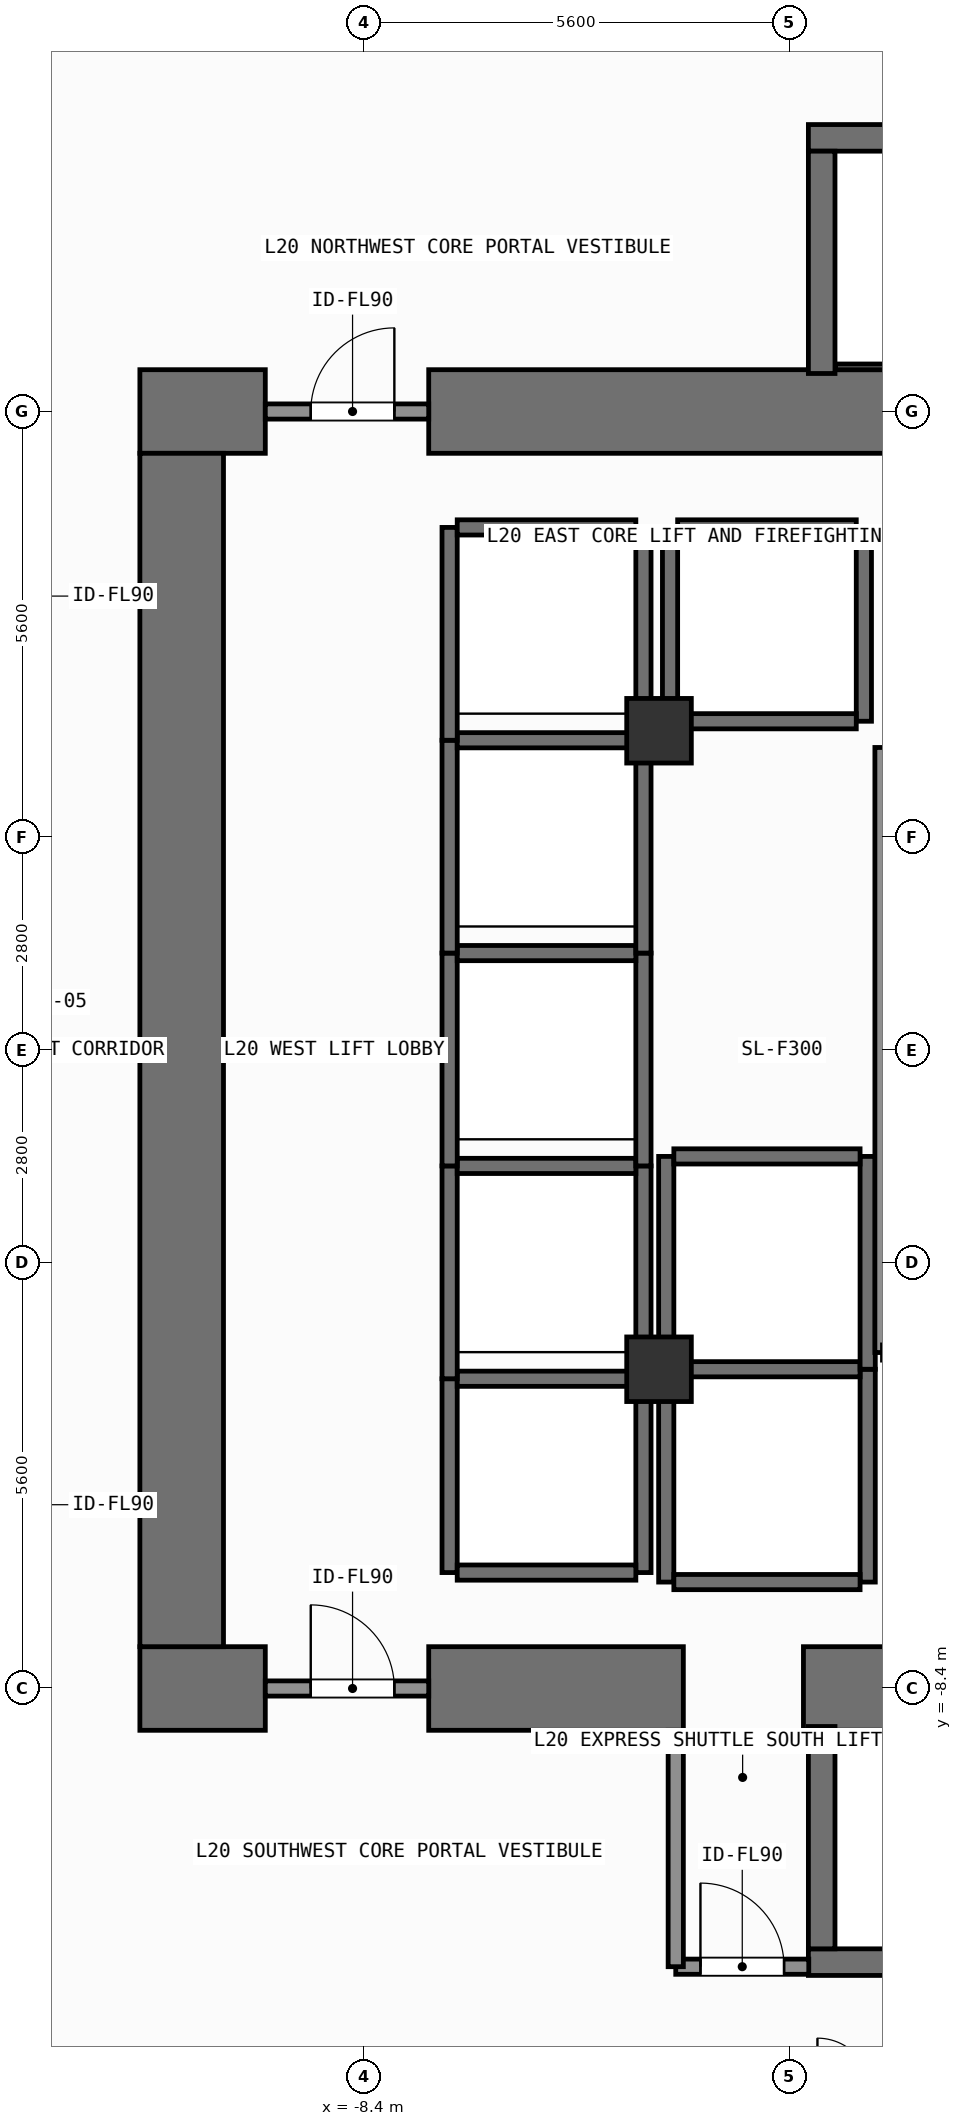
"""IFC4 building model, lengths in metres.
Left out: names, types, materials, properties, quantities, classifications, styles, units other than length and angle.
Written with IfcOpenShell. Run it as: python <this file> out.ifc"""

import sys

from ifc_helpers import new_model, si_unit, direction, frame, frame_2d, origin, origin_2d, place, context, subcontext, project, spatial, rectangle, extrude, element, fill, save


model = new_model("IFC4")
c1 = context("Model", 3, precision=1e-05, world=origin(), true_north=direction((0.0, 1.0)))
c2 = subcontext(c1, "Body", "Model", "MODEL_VIEW")
j1 = project(units=[si_unit("LENGTHUNIT", "METRE"), si_unit("PLANEANGLEUNIT", "RADIAN")], contexts=[c1])
p1 = place(None, origin())
s1 = spatial("IfcSite", under=j1, at=p1, CompositionType="ELEMENT")
p2 = place(p1, origin())
s2 = spatial("IfcBuilding", under=s1, at=p2, CompositionType="ELEMENT")
p3 = place(p2, frame((0.0, 0.0, 77.4)))
s3 = spatial("IfcBuildingStorey", under=s2, at=p3, CompositionType="ELEMENT", Elevation=77.4)
p4 = place(p3, frame((-11.35, -8.4, 0.0), z_axis=(0.0, 0.0, 1.0), x_axis=(1.0, 0.0, 0.0)))
e1 = element("IfcWall", 1, at=p4, inside=s3, PredefinedType="SHEAR", context=c2, shape_type="SweptSolid", body=[
    extrude(rectangle(XDim=1.65, YDim=1.1, at=frame_2d((0.825, 0.0))), origin(), (0.0, 0.0, 1.0), 7.8),
])
p5 = place(p3, frame((-7.55, -8.4, 0.0), z_axis=(0.0, 0.0, 1.0), x_axis=(1.0, 0.0, 0.0)))
e2 = element("IfcWall", 2, at=p5, inside=s3, PredefinedType="SHEAR", context=c2, shape_type="SweptSolid", body=[
    extrude(rectangle(XDim=3.35, YDim=1.1, at=frame_2d((1.675, 0.0))), origin(), (0.0, 0.0, 1.0), 7.8),
])
p6 = place(p3, frame((-2.62, -8.4, 0.0), z_axis=(0.0, 0.0, 1.0), x_axis=(1.0, 0.0, 0.0)))
e3 = element("IfcWall", 3, at=p6, inside=s3, PredefinedType="SHEAR", context=c2, shape_type="SweptSolid", body=[
    extrude(rectangle(XDim=7.27, YDim=1.1, at=frame_2d((3.635, 0.0))), origin(), (0.0, 0.0, 1.0), 7.8),
])
p7 = place(p3, frame((-11.35, 8.4, 0.0), z_axis=(0.0, 0.0, 1.0), x_axis=(1.0, 0.0, 0.0)))
e4 = element("IfcWall", 4, at=p7, inside=s3, PredefinedType="SHEAR", context=c2, shape_type="SweptSolid", body=[
    extrude(rectangle(XDim=1.65, YDim=1.1, at=frame_2d((0.825, 0.0))), origin(), (0.0, 0.0, 1.0), 7.8),
])
p8 = place(p3, frame((-7.55, 8.4, 0.0), z_axis=(0.0, 0.0, 1.0), x_axis=(1.0, 0.0, 0.0)))
e5 = element("IfcWall", 5, at=p8, inside=s3, PredefinedType="SHEAR", context=c2, shape_type="SweptSolid", body=[
    extrude(rectangle(XDim=16.5, YDim=1.1, at=frame_2d((8.25, 0.0))), origin(), (0.0, 0.0, 1.0), 7.8),
])
p9 = place(p3, frame((-10.8, -7.85, 0.0), z_axis=(0.0, 0.0, 1.0), x_axis=(0.0, 1.0, 0.0)))
e6 = element("IfcWall", 6, at=p9, inside=s3, PredefinedType="SHEAR", context=c2, shape_type="SweptSolid", body=[
    extrude(rectangle(XDim=15.7, YDim=1.1, at=frame_2d((7.85, 0.0))), origin(), (0.0, 0.0, 1.0), 7.8),
])
p10 = place(p3, frame((-2.555, -12.0, 0.0), z_axis=(0.0, 0.0, 1.0), x_axis=(1.0, 0.0, 0.0)))
e7 = element("IfcWall", 7, at=p10, inside=s3, PredefinedType="SHEAR", context=c2, shape_type="SweptSolid", body=[
    extrude(rectangle(XDim=7.31, YDim=0.35, at=frame_2d((3.655, 0.0))), origin(), (0.0, 0.0, 1.0), 7.8),
])
p11 = place(p3, frame((-2.2, -8.988, 0.0), z_axis=(0.0, 0.0, 1.0), x_axis=(1.0, 0.0, 0.0)))
e8 = element("IfcWall", 8, at=p11, inside=s3, PredefinedType="SHEAR", context=c2, shape_type="SweptSolid", body=[
    extrude(rectangle(XDim=6.6, YDim=0.075, at=frame_2d((3.3, 0.0))), origin(), (0.0, 0.0, 1.0), 7.8),
])
p12 = place(p3, frame((-2.38, -11.825, 0.0), z_axis=(0.0, 0.0, 1.0), x_axis=(0.0, 1.0, 0.0)))
e9 = element("IfcWall", 9, at=p12, inside=s3, PredefinedType="SHEAR", context=c2, shape_type="SweptSolid", body=[
    extrude(rectangle(XDim=2.925, YDim=0.35, at=frame_2d((1.462, 0.0))), origin(), (0.0, 0.0, 1.0), 7.8),
])
p13 = place(p3, frame((-2.555, 12.0, 0.0), z_axis=(0.0, 0.0, 1.0), x_axis=(1.0, 0.0, 0.0)))
e10 = element("IfcWall", 10, at=p13, inside=s3, PredefinedType="SHEAR", context=c2, shape_type="SweptSolid", body=[
    extrude(rectangle(XDim=7.31, YDim=0.35, at=frame_2d((3.655, 0.0))), origin(), (0.0, 0.0, 1.0), 7.8),
])
p14 = place(p3, frame((-2.2, 8.988, 0.0), z_axis=(0.0, 0.0, 1.0), x_axis=(1.0, 0.0, 0.0)))
e11 = element("IfcWall", 11, at=p14, inside=s3, PredefinedType="SHEAR", context=c2, shape_type="SweptSolid", body=[
    extrude(rectangle(XDim=6.6, YDim=0.075, at=frame_2d((3.3, 0.0))), origin(), (0.0, 0.0, 1.0), 7.8),
])
p15 = place(p3, frame((-2.38, 8.9, 0.0), z_axis=(0.0, 0.0, 1.0), x_axis=(0.0, 1.0, 0.0)))
e12 = element("IfcWall", 12, at=p15, inside=s3, PredefinedType="SHEAR", context=c2, shape_type="SweptSolid", body=[
    extrude(rectangle(XDim=2.925, YDim=0.35, at=frame_2d((1.462, 0.0))), origin(), (0.0, 0.0, 1.0), 7.8),
])
for number, where, z_axis, x_axis in (
    (13, (-4.52, -4.2, 0.0), (0.0, 0.0, 1.0), (1.0, 0.0, 0.0)),
    (14, (-4.52, 4.2, 0.0), (0.0, 0.0, 1.0), (1.0, 0.0, 0.0)),
):
    element("IfcColumn", number, at=place(p3, frame(where, z_axis=z_axis, x_axis=x_axis)), inside=s3, PredefinedType="COLUMN", context=c2, shape_type="SweptSolid", body=[
        extrude(rectangle(XDim=0.85, YDim=0.85, at=origin_2d()), origin(), (0.0, 0.0, 1.0), 7.8),
    ])
for number, where, z_axis, x_axis in (
    (15, (-7.275, -6.875, 0.0), (0.0, 0.0, 1.0), (0.0, 1.0, 0.0)),
    (16, (-4.725, -6.875, 0.0), (0.0, 0.0, 1.0), (0.0, 1.0, 0.0)),
):
    element("IfcWall", number, at=place(p3, frame(where, z_axis=z_axis, x_axis=x_axis)), inside=s3, PredefinedType="SHEAR", context=c2, shape_type="SweptSolid", body=[
        extrude(rectangle(XDim=2.55, YDim=0.2, at=frame_2d((1.275, 0.0))), origin(), (0.0, 0.0, 1.0), 7.52),
    ])
for number, where, z_axis, x_axis in (
    (17, (-7.175, -6.875, 0.0), (0.0, 0.0, 1.0), (1.0, 0.0, 0.0)),
    (18, (-7.175, -4.325, 0.0), (0.0, 0.0, 1.0), (1.0, 0.0, 0.0)),
):
    element("IfcWall", number, at=place(p3, frame(where, z_axis=z_axis, x_axis=x_axis)), inside=s3, PredefinedType="SHEAR", context=c2, shape_type="SweptSolid", body=[
        extrude(rectangle(XDim=2.35, YDim=0.2, at=frame_2d((1.175, 0.0))), origin(), (0.0, 0.0, 1.0), 7.52),
    ])
for number, where, z_axis, x_axis in (
    (19, (-7.275, -4.325, 0.0), (0.0, 0.0, 1.0), (0.0, 1.0, 0.0)),
    (20, (-4.725, -4.325, 0.0), (0.0, 0.0, 1.0), (0.0, 1.0, 0.0)),
):
    element("IfcWall", number, at=place(p3, frame(where, z_axis=z_axis, x_axis=x_axis)), inside=s3, PredefinedType="SHEAR", context=c2, shape_type="SweptSolid", body=[
        extrude(rectangle(XDim=2.8, YDim=0.2, at=frame_2d((1.4, 0.0))), origin(), (0.0, 0.0, 1.0), 7.52),
    ])
p16 = place(p3, frame((-7.175, -1.525, 0.0), z_axis=(0.0, 0.0, 1.0), x_axis=(1.0, 0.0, 0.0)))
e21 = element("IfcWall", 21, at=p16, inside=s3, PredefinedType="SHEAR", context=c2, shape_type="SweptSolid", body=[
    extrude(rectangle(XDim=2.35, YDim=0.2, at=frame_2d((1.175, 0.0))), origin(), (0.0, 0.0, 1.0), 7.52),
])
for number, where, z_axis, x_axis in (
    (22, (-7.275, -1.525, 0.0), (0.0, 0.0, 1.0), (0.0, 1.0, 0.0)),
    (23, (-4.725, -1.525, 0.0), (0.0, 0.0, 1.0), (0.0, 1.0, 0.0)),
):
    element("IfcWall", number, at=place(p3, frame(where, z_axis=z_axis, x_axis=x_axis)), inside=s3, PredefinedType="SHEAR", context=c2, shape_type="SweptSolid", body=[
        extrude(rectangle(XDim=2.8, YDim=0.2, at=frame_2d((1.4, 0.0))), origin(), (0.0, 0.0, 1.0), 7.52),
    ])
p17 = place(p3, frame((-7.175, 1.275, 0.0), z_axis=(0.0, 0.0, 1.0), x_axis=(1.0, 0.0, 0.0)))
e24 = element("IfcWall", 24, at=p17, inside=s3, PredefinedType="SHEAR", context=c2, shape_type="SweptSolid", body=[
    extrude(rectangle(XDim=2.35, YDim=0.2, at=frame_2d((1.175, 0.0))), origin(), (0.0, 0.0, 1.0), 7.52),
])
for number, where, z_axis, x_axis in (
    (25, (-7.275, 1.275, 0.0), (0.0, 0.0, 1.0), (0.0, 1.0, 0.0)),
    (26, (-4.725, 1.275, 0.0), (0.0, 0.0, 1.0), (0.0, 1.0, 0.0)),
):
    element("IfcWall", number, at=place(p3, frame(where, z_axis=z_axis, x_axis=x_axis)), inside=s3, PredefinedType="SHEAR", context=c2, shape_type="SweptSolid", body=[
        extrude(rectangle(XDim=2.8, YDim=0.2, at=frame_2d((1.4, 0.0))), origin(), (0.0, 0.0, 1.0), 7.52),
    ])
p18 = place(p3, frame((-7.175, 4.075, 0.0), z_axis=(0.0, 0.0, 1.0), x_axis=(1.0, 0.0, 0.0)))
e27 = element("IfcWall", 27, at=p18, inside=s3, PredefinedType="SHEAR", context=c2, shape_type="SweptSolid", body=[
    extrude(rectangle(XDim=2.35, YDim=0.2, at=frame_2d((1.175, 0.0))), origin(), (0.0, 0.0, 1.0), 7.52),
])
for number, where, z_axis, x_axis in (
    (28, (-7.275, 4.075, 0.0), (0.0, 0.0, 1.0), (0.0, 1.0, 0.0)),
    (29, (-4.725, 4.075, 0.0), (0.0, 0.0, 1.0), (0.0, 1.0, 0.0)),
):
    element("IfcWall", number, at=place(p3, frame(where, z_axis=z_axis, x_axis=x_axis)), inside=s3, PredefinedType="SHEAR", context=c2, shape_type="SweptSolid", body=[
        extrude(rectangle(XDim=2.8, YDim=0.2, at=frame_2d((1.4, 0.0))), origin(), (0.0, 0.0, 1.0), 7.52),
    ])
p19 = place(p3, frame((-7.175, 6.875, 0.0), z_axis=(0.0, 0.0, 1.0), x_axis=(1.0, 0.0, 0.0)))
e30 = element("IfcWall", 30, at=p19, inside=s3, PredefinedType="SHEAR", context=c2, shape_type="SweptSolid", body=[
    extrude(rectangle(XDim=2.35, YDim=0.2, at=frame_2d((1.175, 0.0))), origin(), (0.0, 0.0, 1.0), 7.52),
])
for number, where, z_axis, x_axis in (
    (31, (-4.375, 4.325, 0.0), (0.0, 0.0, 1.0), (0.0, 1.0, 0.0)),
    (32, (-1.825, 4.325, 0.0), (0.0, 0.0, 1.0), (0.0, 1.0, 0.0)),
):
    element("IfcWall", number, at=place(p3, frame(where, z_axis=z_axis, x_axis=x_axis)), inside=s3, PredefinedType="SHEAR", context=c2, shape_type="SweptSolid", body=[
        extrude(rectangle(XDim=2.55, YDim=0.2, at=frame_2d((1.275, 0.0))), origin(), (0.0, 0.0, 1.0), 7.52),
    ])
for number, where, z_axis, x_axis in (
    (33, (-4.275, 4.325, 0.0), (0.0, 0.0, 1.0), (1.0, 0.0, 0.0)),
    (34, (-4.275, 6.875, 0.0), (0.0, 0.0, 1.0), (1.0, 0.0, 0.0)),
):
    element("IfcWall", number, at=place(p3, frame(where, z_axis=z_axis, x_axis=x_axis)), inside=s3, PredefinedType="SHEAR", context=c2, shape_type="SweptSolid", body=[
        extrude(rectangle(XDim=2.35, YDim=0.2, at=frame_2d((1.175, 0.0))), origin(), (0.0, 0.0, 1.0), 7.52),
    ])
for number, where, z_axis, x_axis in (
    (35, (-4.425, -7.0, 0.0), (0.0, 0.0, 1.0), (0.0, 1.0, 0.0)),
    (36, (-1.775, -7.0, 0.0), (0.0, 0.0, 1.0), (0.0, 1.0, 0.0)),
):
    element("IfcWall", number, at=place(p3, frame(where, z_axis=z_axis, x_axis=x_axis)), inside=s3, PredefinedType="SHEAR", context=c2, shape_type="SweptSolid", body=[
        extrude(rectangle(XDim=2.8, YDim=0.2, at=frame_2d((1.4, 0.0))), origin(), (0.0, 0.0, 1.0), 7.52),
    ])
for number, where, z_axis, x_axis in (
    (37, (-4.325, -7.0, 0.0), (0.0, 0.0, 1.0), (1.0, 0.0, 0.0)),
    (38, (-4.325, -4.2, 0.0), (0.0, 0.0, 1.0), (1.0, 0.0, 0.0)),
):
    element("IfcWall", number, at=place(p3, frame(where, z_axis=z_axis, x_axis=x_axis)), inside=s3, PredefinedType="SHEAR", context=c2, shape_type="SweptSolid", body=[
        extrude(rectangle(XDim=2.45, YDim=0.2, at=frame_2d((1.225, 0.0))), origin(), (0.0, 0.0, 1.0), 7.52),
    ])
for number, where, z_axis, x_axis in (
    (39, (-4.425, -4.2, 0.0), (0.0, 0.0, 1.0), (0.0, 1.0, 0.0)),
    (40, (-1.775, -4.2, 0.0), (0.0, 0.0, 1.0), (0.0, 1.0, 0.0)),
):
    element("IfcWall", number, at=place(p3, frame(where, z_axis=z_axis, x_axis=x_axis)), inside=s3, PredefinedType="SHEAR", context=c2, shape_type="SweptSolid", body=[
        extrude(rectangle(XDim=2.8, YDim=0.2, at=frame_2d((1.4, 0.0))), origin(), (0.0, 0.0, 1.0), 7.52),
    ])
p20 = place(p3, frame((-4.325, -1.4, 0.0), z_axis=(0.0, 0.0, 1.0), x_axis=(1.0, 0.0, 0.0)))
e41 = element("IfcWall", 41, at=p20, inside=s3, PredefinedType="SHEAR", context=c2, shape_type="SweptSolid", body=[
    extrude(rectangle(XDim=2.45, YDim=0.2, at=frame_2d((1.225, 0.0))), origin(), (0.0, 0.0, 1.0), 7.52),
])
p21 = place(p3, frame((-9.7, -8.4, 0.0), z_axis=(0.0, 0.0, 1.0), x_axis=(1.0, 0.0, 0.0)))
e42 = element("IfcWall", 42, at=p21, inside=s3, PredefinedType="SOLIDWALL", context=c2, shape_type="SweptSolid", body=[
    extrude(rectangle(XDim=2.15, YDim=0.2, at=frame_2d((1.075, 0.0))), origin(), (0.0, 0.0, 1.0), 6.56),
])
p22 = place(p21, frame((0.598, 0.0, 0.0)))
e43 = element("IfcOpeningElement", 43, at=p22, cuts=e42, PredefinedType="OPENING", context=c2, shape_type="SweptSolid", body=[
    extrude(rectangle(XDim=1.1, YDim=2.15, at=frame_2d((0.55, 1.075))), frame((0.0, 0.11, 0.0), z_axis=(0.0, -1.0, 0.0), x_axis=(1.0, 0.0, 0.0)), (0.0, 0.0, 1.0), 0.22),
])
p23 = place(p3, frame((-9.7, 8.4, 0.0), z_axis=(0.0, 0.0, 1.0), x_axis=(1.0, 0.0, 0.0)))
e44 = element("IfcWall", 44, at=p23, inside=s3, PredefinedType="SOLIDWALL", context=c2, shape_type="SweptSolid", body=[
    extrude(rectangle(XDim=2.15, YDim=0.2, at=frame_2d((1.075, 0.0))), origin(), (0.0, 0.0, 1.0), 6.56),
])
p24 = place(p23, frame((0.598, 0.0, 0.0)))
e45 = element("IfcOpeningElement", 45, at=p24, cuts=e44, PredefinedType="OPENING", context=c2, shape_type="SweptSolid", body=[
    extrude(rectangle(XDim=1.1, YDim=2.15, at=frame_2d((0.55, 1.075))), frame((0.0, 0.11, 0.0), z_axis=(0.0, -1.0, 0.0), x_axis=(1.0, 0.0, 0.0)), (0.0, 0.0, 1.0), 0.22),
])
p25 = place(p3, frame((-4.3, -12.06, 0.0), z_axis=(0.0, 0.0, 1.0), x_axis=(1.0, 0.0, 0.0)))
e46 = element("IfcWall", 46, at=p25, inside=s3, PredefinedType="SOLIDWALL", context=c2, shape_type="SweptSolid", body=[
    extrude(rectangle(XDim=1.75, YDim=0.2, at=frame_2d((0.875, 0.0))), origin(), (0.0, 0.0, 1.0), 7.52),
])
p26 = place(p25, frame((0.325, 0.0, 0.0)))
e47 = element("IfcOpeningElement", 47, at=p26, cuts=e46, PredefinedType="OPENING", context=c2, shape_type="SweptSolid", body=[
    extrude(rectangle(XDim=1.1, YDim=2.15, at=frame_2d((0.55, 1.075))), frame((0.0, 0.11, 0.0), z_axis=(0.0, -1.0, 0.0), x_axis=(1.0, 0.0, 0.0)), (0.0, 0.0, 1.0), 0.22),
])
p27 = place(p3, frame((-4.3, -12.06, 0.0), z_axis=(0.0, 0.0, 1.0), x_axis=(0.0, 1.0, 0.0)))
e48 = element("IfcWall", 48, at=p27, inside=s3, PredefinedType="SOLIDWALL", context=c2, shape_type="SweptSolid", body=[
    extrude(rectangle(XDim=3.11, YDim=0.2, at=frame_2d((1.555, 0.0))), origin(), (0.0, 0.0, 1.0), 7.52),
])
p28 = place(p3, frame((-1.58, -3.98, 0.0), z_axis=(0.0, 0.0, 1.0), x_axis=(0.0, 1.0, 0.0)))
e49 = element("IfcWall", 49, at=p28, inside=s3, PredefinedType="SOLIDWALL", context=c2, shape_type="SweptSolid", body=[
    extrude(rectangle(XDim=7.96, YDim=0.2, at=frame_2d((3.98, 0.0))), origin(), (0.0, 0.0, 1.0), 7.52),
])
p29 = place(p22, origin())
e50 = element("IfcDoor", 50, at=p29, inside=s3, OperationType="SINGLE_SWING_LEFT", PredefinedType="DOOR", context=c2, shape_type="SweptSolid", body=[
    extrude(rectangle(XDim=1.1, YDim=2.15, at=frame_2d((0.55, 1.075))), frame((0.0, 0.025, 0.0), z_axis=(0.0, -1.0, 0.0), x_axis=(1.0, 0.0, 0.0)), (0.0, 0.0, 1.0), 0.05),
])
fill(e43, e50)
p30 = place(p24, origin())
e51 = element("IfcDoor", 51, at=p30, inside=s3, OperationType="SINGLE_SWING_RIGHT", PredefinedType="DOOR", context=c2, shape_type="SweptSolid", body=[
    extrude(rectangle(XDim=1.1, YDim=2.15, at=frame_2d((0.55, 1.075))), frame((0.0, 0.025, 0.0), z_axis=(0.0, -1.0, 0.0), x_axis=(1.0, 0.0, 0.0)), (0.0, 0.0, 1.0), 0.05),
])
fill(e45, e51)
p31 = place(p26, origin())
e52 = element("IfcDoor", 52, at=p31, inside=s3, OperationType="SINGLE_SWING_LEFT", PredefinedType="DOOR", context=c2, shape_type="SweptSolid", body=[
    extrude(rectangle(XDim=1.1, YDim=2.15, at=frame_2d((0.55, 1.075))), frame((0.0, 0.025, 0.0), z_axis=(0.0, -1.0, 0.0), x_axis=(1.0, 0.0, 0.0)), (0.0, 0.0, 1.0), 0.05),
])
fill(e47, e52)
save(model, sys.argv[1])
